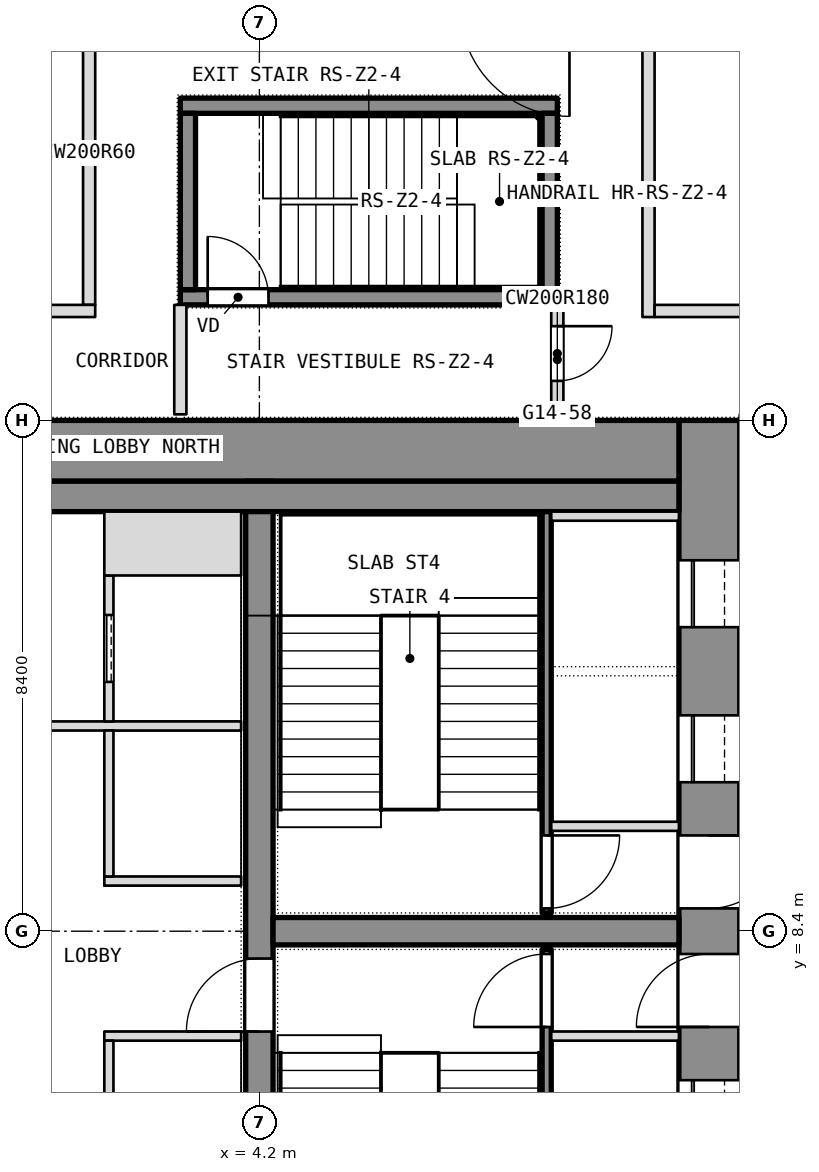
"""IFC4 building model, lengths in metres.
Left out: names, types, materials, properties, quantities, classifications, styles, units other than length and angle.
Written with IfcOpenShell. Run it as: python <this file> out.ifc"""

import sys

from ifc_helpers import new_model, si_unit, direction, frame, frame_2d, origin, place, context, subcontext, project, spatial, rectangle, extrude, element, fill, save


model = new_model("IFC4")
c1 = context("Model", 3, precision=1e-05, world=origin(), true_north=direction((0.0, 1.0)))
c2 = subcontext(c1, "Body", "Model", "MODEL_VIEW")
j1 = project(units=[si_unit("LENGTHUNIT", "METRE"), si_unit("PLANEANGLEUNIT", "RADIAN")], contexts=[c1])
p1 = place(None, origin())
s1 = spatial("IfcSite", under=j1, at=p1, CompositionType="ELEMENT")
p2 = place(p1, origin())
s2 = spatial("IfcBuilding", under=s1, at=p2, CompositionType="ELEMENT")
p3 = place(p2, frame((0.0, 0.0, 158.9)))
s3 = spatial("IfcBuildingStorey", under=s2, at=p3, CompositionType="ELEMENT", Elevation=158.9)
p4 = place(p3, frame((11.6, 0.0, 0.0), z_axis=(0.0, 0.0, 1.0), x_axis=(0.0, 1.0, 0.0)))
e1 = element("IfcWall", 1, at=p4, inside=s3, PredefinedType="SHEAR", context=c2, shape_type="SweptSolid", body=[
    extrude(rectangle(XDim=16.8, YDim=1.0, at=frame_2d((8.4, 0.0))), origin(), (0.0, 0.0, 1.0), 3.6),
])
p5 = place(p4, frame((2.3, 0.0, 0.0)))
e2 = element("IfcOpeningElement", 2, at=p5, cuts=e1, PredefinedType="OPENING", context=c2, shape_type="SweptSolid", body=[
    extrude(rectangle(XDim=1.1, YDim=2.1, at=frame_2d((0.55, 1.05))), frame((0.0, 0.5, 0.0), z_axis=(0.0, -1.0, 0.0), x_axis=(1.0, 0.0, 0.0)), (0.0, 0.0, 1.0), 1.0),
])
p6 = place(p4, frame((4.85, 0.0, 0.0)))
e3 = element("IfcOpeningElement", 3, at=p6, cuts=e1, PredefinedType="OPENING", context=c2, shape_type="SweptSolid", body=[
    extrude(rectangle(XDim=1.1, YDim=2.1, at=frame_2d((0.55, 1.05))), frame((0.0, 0.5, 0.0), z_axis=(0.0, -1.0, 0.0), x_axis=(1.0, 0.0, 0.0)), (0.0, 0.0, 1.0), 1.0),
])
p7 = place(p4, frame((6.825, 0.0, 0.0)))
e4 = element("IfcOpeningElement", 4, at=p7, cuts=e1, PredefinedType="OPENING", context=c2, shape_type="SweptSolid", body=[
    extrude(rectangle(XDim=1.2, YDim=2.1, at=frame_2d((0.6, 1.05))), frame((0.0, 0.5, 0.0), z_axis=(0.0, -1.0, 0.0), x_axis=(1.0, 0.0, 0.0)), (0.0, 0.0, 1.0), 1.0),
])
p8 = place(p4, frame((13.4, 0.0, 0.0)))
e5 = element("IfcOpeningElement", 5, at=p8, cuts=e1, PredefinedType="OPENING", context=c2, shape_type="SweptSolid", body=[
    extrude(rectangle(XDim=1.1, YDim=2.1, at=frame_2d((0.55, 1.05))), frame((0.0, 0.5, 0.0), z_axis=(0.0, -1.0, 0.0), x_axis=(1.0, 0.0, 0.0)), (0.0, 0.0, 1.0), 1.0),
])
p9 = place(p4, frame((10.85, 0.0, 0.0)))
e6 = element("IfcOpeningElement", 6, at=p9, cuts=e1, PredefinedType="OPENING", context=c2, shape_type="SweptSolid", body=[
    extrude(rectangle(XDim=1.1, YDim=2.1, at=frame_2d((0.55, 1.05))), frame((0.0, 0.5, 0.0), z_axis=(0.0, -1.0, 0.0), x_axis=(1.0, 0.0, 0.0)), (0.0, 0.0, 1.0), 1.0),
])
p10 = place(p4, frame((8.775, 0.0, 0.0)))
e7 = element("IfcOpeningElement", 7, at=p10, cuts=e1, PredefinedType="OPENING", context=c2, shape_type="SweptSolid", body=[
    extrude(rectangle(XDim=1.2, YDim=2.1, at=frame_2d((0.6, 1.05))), frame((0.0, 0.5, 0.0), z_axis=(0.0, -1.0, 0.0), x_axis=(1.0, 0.0, 0.0)), (0.0, 0.0, 1.0), 1.0),
])
p11 = place(p3, frame((-11.1, 16.3, 0.0), z_axis=(0.0, 0.0, 1.0), x_axis=(1.0, 0.0, 0.0)))
e8 = element("IfcWall", 8, at=p11, inside=s3, PredefinedType="SHEAR", context=c2, shape_type="SweptSolid", body=[
    extrude(rectangle(XDim=22.2, YDim=1.0, at=frame_2d((11.1, 0.0))), origin(), (0.0, 0.0, 1.0), 3.6),
])
p12 = place(p3, frame((4.2, 1.0, 0.0), z_axis=(0.0, 0.0, 1.0), x_axis=(0.0, 1.0, 0.0)))
e9 = element("IfcWall", 9, at=p12, inside=s3, PredefinedType="SHEAR", context=c2, shape_type="SweptSolid", body=[
    extrude(rectangle(XDim=14.8, YDim=0.45, at=frame_2d((7.4, 0.0))), origin(), (0.0, 0.0, 1.0), 3.6),
])
p13 = place(p12, frame((5.75, 0.0, 0.0)))
e10 = element("IfcOpeningElement", 10, at=p13, cuts=e9, PredefinedType="OPENING", context=c2, shape_type="SweptSolid", body=[
    extrude(rectangle(XDim=1.2, YDim=2.1, at=frame_2d((0.6, 1.05))), frame((0.0, 0.225, 0.0), z_axis=(0.0, -1.0, 0.0), x_axis=(1.0, 0.0, 0.0)), (0.0, 0.0, 1.0), 0.45),
])
p14 = place(p3, frame((4.425, 8.4, 0.0), z_axis=(0.0, 0.0, 1.0), x_axis=(1.0, 0.0, 0.0)))
e11 = element("IfcWall", 11, at=p14, inside=s3, PredefinedType="SHEAR", context=c2, shape_type="SweptSolid", body=[
    extrude(rectangle(XDim=6.675, YDim=0.45, at=frame_2d((3.337, 0.0))), origin(), (0.0, 0.0, 1.0), 3.6),
])
p15 = place(p3, frame((10.6, 18.5, 0.0), z_axis=(0.0, 0.0, 1.0), x_axis=(0.0, 1.0, 0.0)))
e12 = element("IfcWall", 12, at=p15, inside=s3, PredefinedType="PARTITIONING", context=c2, shape_type="SweptSolid", body=[
    extrude(rectangle(XDim=5.0, YDim=0.2, at=frame_2d((2.5, 0.0))), origin(), (0.0, 0.0, 1.0), 3.34),
])
p16 = place(p3, frame((9.1, 16.9, 0.0), z_axis=(0.0, 0.0, 1.0), x_axis=(0.0, 1.0, 0.0)))
e13 = element("IfcWall", 13, at=p16, inside=s3, PredefinedType="PARTITIONING", context=c2, shape_type="SweptSolid", body=[
    extrude(rectangle(XDim=1.8, YDim=0.2, at=frame_2d((0.9, 0.0))), origin(), (0.0, 0.0, 1.0), 3.34),
])
p17 = place(p16, frame((0.55, 0.0, 0.0)))
e14 = element("IfcOpeningElement", 14, at=p17, cuts=e13, PredefinedType="OPENING", context=c2, shape_type="SweptSolid", body=[
    extrude(rectangle(XDim=0.9, YDim=2.1, at=frame_2d((0.45, 1.05))), frame((0.0, 0.1, 0.0), z_axis=(0.0, -1.0, 0.0), x_axis=(1.0, 0.0, 0.0)), (0.0, 0.0, 1.0), 0.2),
])
p18 = place(p3, frame((2.9, 16.9, 0.0), z_axis=(0.0, 0.0, 1.0), x_axis=(0.0, 1.0, 0.0)))
e15 = element("IfcWall", 15, at=p18, inside=s3, PredefinedType="PARTITIONING", context=c2, shape_type="SweptSolid", body=[
    extrude(rectangle(XDim=1.8, YDim=0.2, at=frame_2d((0.9, 0.0))), origin(), (0.0, 0.0, 1.0), 3.34),
])
p19 = place(p3, frame((1.4, 18.7, 0.0), z_axis=(0.0, 0.0, 1.0), x_axis=(0.0, 1.0, 0.0)))
e16 = element("IfcWall", 16, at=p19, inside=s3, PredefinedType="PARTITIONING", context=c2, shape_type="SweptSolid", body=[
    extrude(rectangle(XDim=5.0, YDim=0.2, at=frame_2d((2.5, 0.0))), origin(), (0.0, 0.0, 1.0), 3.34),
])
p20 = place(p3, frame((-16.9, 18.6, 0.0), z_axis=(0.0, 0.0, 1.0), x_axis=(1.0, 0.0, 0.0)))
e17 = element("IfcWall", 17, at=p20, inside=s3, PredefinedType="PARTITIONING", context=c2, shape_type="SweptSolid", body=[
    extrude(rectangle(XDim=18.4, YDim=0.2, at=frame_2d((9.2, 0.0))), origin(), (0.0, 0.0, 1.0), 3.34),
])
p21 = place(p20, frame((0.5, 0.0, 0.0)))
e18 = element("IfcOpeningElement", 18, at=p21, cuts=e17, PredefinedType="OPENING", context=c2, shape_type="SweptSolid", body=[
    extrude(rectangle(XDim=1.0, YDim=2.1, at=frame_2d((0.5, 1.05))), frame((0.0, 0.1, 0.0), z_axis=(0.0, -1.0, 0.0), x_axis=(1.0, 0.0, 0.0)), (0.0, 0.0, 1.0), 0.2),
])
p22 = place(p20, frame((15.0, 0.0, 0.0)))
e19 = element("IfcOpeningElement", 19, at=p22, cuts=e17, PredefinedType="OPENING", context=c2, shape_type="SweptSolid", body=[
    extrude(rectangle(XDim=1.0, YDim=2.1, at=frame_2d((0.5, 1.05))), frame((0.0, 0.1, 0.0), z_axis=(0.0, -1.0, 0.0), x_axis=(1.0, 0.0, 0.0)), (0.0, 0.0, 1.0), 0.2),
])
p23 = place(p20, frame((5.9, 0.0, 0.0)))
e20 = element("IfcOpeningElement", 20, at=p23, cuts=e17, PredefinedType="OPENING", context=c2, shape_type="SweptSolid", body=[
    extrude(rectangle(XDim=1.0, YDim=2.1, at=frame_2d((0.5, 1.05))), frame((0.0, 0.1, 0.0), z_axis=(0.0, -1.0, 0.0), x_axis=(1.0, 0.0, 0.0)), (0.0, 0.0, 1.0), 0.2),
])
p24 = place(p20, frame((10.1, 0.0, 0.0)))
e21 = element("IfcOpeningElement", 21, at=p24, cuts=e17, PredefinedType="OPENING", context=c2, shape_type="SweptSolid", body=[
    extrude(rectangle(XDim=1.0, YDim=2.1, at=frame_2d((0.5, 1.05))), frame((0.0, 0.1, 0.0), z_axis=(0.0, -1.0, 0.0), x_axis=(1.0, 0.0, 0.0)), (0.0, 0.0, 1.0), 0.2),
])
p25 = place(p3, frame((10.7, 18.6, 0.0), z_axis=(0.0, 0.0, 1.0), x_axis=(1.0, 0.0, 0.0)))
e22 = element("IfcWall", 22, at=p25, inside=s3, PredefinedType="PARTITIONING", context=c2, shape_type="SweptSolid", body=[
    extrude(rectangle(XDim=6.2, YDim=0.2, at=frame_2d((3.1, 0.0))), origin(), (0.0, 0.0, 1.0), 3.34),
])
p26 = place(p25, frame((2.3, 0.0, 0.0)))
e23 = element("IfcOpeningElement", 23, at=p26, cuts=e22, PredefinedType="OPENING", context=c2, shape_type="SweptSolid", body=[
    extrude(rectangle(XDim=1.0, YDim=2.1, at=frame_2d((0.5, 1.05))), frame((0.0, 0.1, 0.0), z_axis=(0.0, -1.0, 0.0), x_axis=(1.0, 0.0, 0.0)), (0.0, 0.0, 1.0), 0.2),
])
p27 = place(p3, frame((-11.1, 15.55, 0.0), z_axis=(0.0, 0.0, 1.0), x_axis=(1.0, 0.0, 0.0)))
e24 = element("IfcWall", 24, at=p27, inside=s3, PredefinedType="PARTITIONING", context=c2, shape_type="SweptSolid", body=[
    extrude(rectangle(XDim=22.2, YDim=0.5, at=frame_2d((11.1, 0.0))), origin(), (0.0, 0.0, 1.0), 3.34),
])
p28 = place(p3, frame((8.925, 1.5, 0.0), z_axis=(0.0, 0.0, 1.0), x_axis=(0.0, 1.0, 0.0)))
e25 = element("IfcWall", 25, at=p28, inside=s3, PredefinedType="SHEAR", context=c2, shape_type="SweptSolid", body=[
    extrude(rectangle(XDim=6.6, YDim=0.15, at=frame_2d((3.3, 0.0))), origin(), (0.0, 0.0, 1.0), 3.34),
])
p29 = place(p28, frame((5.325, 0.0, 0.0)))
e26 = element("IfcOpeningElement", 26, at=p29, cuts=e25, PredefinedType="OPENING", context=c2, shape_type="SweptSolid", body=[
    extrude(rectangle(XDim=1.2, YDim=2.1, at=frame_2d((0.6, 1.05))), frame((0.0, 0.075, 0.0), z_axis=(0.0, -1.0, 0.0), x_axis=(1.0, 0.0, 0.0)), (0.0, 0.0, 1.0), 0.15),
])
p30 = place(p3, frame((9.0, 6.675, 0.0), z_axis=(0.0, 0.0, 1.0), x_axis=(1.0, 0.0, 0.0)))
e27 = element("IfcWall", 27, at=p30, inside=s3, PredefinedType="SHEAR", context=c2, shape_type="SweptSolid", body=[
    extrude(rectangle(XDim=2.1, YDim=0.15, at=frame_2d((1.05, 0.0))), origin(), (0.0, 0.0, 1.0), 3.6),
])
p31 = place(p3, frame((8.925, 8.7, 0.0), z_axis=(0.0, 0.0, 1.0), x_axis=(0.0, 1.0, 0.0)))
e28 = element("IfcWall", 28, at=p31, inside=s3, PredefinedType="SHEAR", context=c2, shape_type="SweptSolid", body=[
    extrude(rectangle(XDim=6.6, YDim=0.15, at=frame_2d((3.3, 0.0))), origin(), (0.0, 0.0, 1.0), 3.34),
])
p32 = place(p31, frame((0.075, 0.0, 0.0)))
e29 = element("IfcOpeningElement", 29, at=p32, cuts=e28, PredefinedType="OPENING", context=c2, shape_type="SweptSolid", body=[
    extrude(rectangle(XDim=1.2, YDim=2.1, at=frame_2d((0.6, 1.05))), frame((0.0, 0.075, 0.0), z_axis=(0.0, -1.0, 0.0), x_axis=(1.0, 0.0, 0.0)), (0.0, 0.0, 1.0), 0.15),
])
for number, where, z_axis, x_axis in (
    (30, (9.0, 10.125, 0.0), (0.0, 0.0, 1.0), (1.0, 0.0, 0.0)),
    (31, (9.0, 15.225, 0.0), (0.0, 0.0, 1.0), (1.0, 0.0, 0.0)),
):
    element("IfcWall", number, at=place(p3, frame(where, z_axis=z_axis, x_axis=x_axis)), inside=s3, PredefinedType="SHEAR", context=c2, shape_type="SweptSolid", body=[
        extrude(rectangle(XDim=2.1, YDim=0.15, at=frame_2d((1.05, 0.0))), origin(), (0.0, 0.0, 1.0), 3.6),
    ])
p33 = place(p3, frame((-3.9, 11.775, 0.0), z_axis=(0.0, 0.0, 1.0), x_axis=(1.0, 0.0, 0.0)))
e32 = element("IfcWall", 32, at=p33, inside=s3, PredefinedType="PARTITIONING", context=c2, shape_type="SweptSolid", body=[
    extrude(rectangle(XDim=7.8, YDim=0.15, at=frame_2d((3.9, 0.0))), origin(), (0.0, 0.0, 1.0), 3.34),
])
p34 = place(p33, frame((3.3, 0.0, 0.0)))
e33 = element("IfcOpeningElement", 33, at=p34, cuts=e32, PredefinedType="OPENING", context=c2, shape_type="SweptSolid", body=[
    extrude(rectangle(XDim=1.2, YDim=2.1, at=frame_2d((0.6, 1.05))), frame((0.0, 0.075, 0.0), z_axis=(0.0, -1.0, 0.0), x_axis=(1.0, 0.0, 0.0)), (0.0, 0.0, 1.0), 0.15),
])
p35 = place(p3, frame((1.725, 11.85, 0.0), z_axis=(0.0, 0.0, 1.0), x_axis=(0.0, 1.0, 0.0)))
e34 = element("IfcWall", 34, at=p35, inside=s3, PredefinedType="SHEAR", context=c2, shape_type="SweptSolid", body=[
    extrude(rectangle(XDim=2.4, YDim=0.15, at=frame_2d((1.2, 0.0))), origin(), (0.0, 0.0, 1.0), 3.6),
])
p36 = place(p35, frame((0.65, 0.0, 0.0)))
e35 = element("IfcOpeningElement", 35, at=p36, cuts=e34, PredefinedType="OPENING", context=c2, shape_type="SweptSolid", body=[
    extrude(rectangle(XDim=1.1, YDim=2.1, at=frame_2d((0.55, 1.05))), frame((0.0, 0.075, 0.0), z_axis=(0.0, -1.0, 0.0), x_axis=(1.0, 0.0, 0.0)), (0.0, 0.0, 1.0), 0.15),
])
p37 = place(p3, frame((1.65, 14.775, 0.0), z_axis=(0.0, 0.0, 1.0), x_axis=(1.0, 0.0, 0.0)))
e36 = element("IfcWall", 36, at=p37, inside=s3, PredefinedType="SHEAR", context=c2, shape_type="SweptSolid", body=[
    extrude(rectangle(XDim=2.25, YDim=1.05, at=frame_2d((1.125, 0.0))), origin(), (0.0, 0.0, 1.0), 3.6),
])
for number, where, z_axis, x_axis in (
    (37, (1.65, 6.675, 0.0), (0.0, 0.0, 1.0), (1.0, 0.0, 0.0)),
    (38, (1.65, 9.225, 0.0), (0.0, 0.0, 1.0), (1.0, 0.0, 0.0)),
):
    element("IfcWall", number, at=place(p3, frame(where, z_axis=z_axis, x_axis=x_axis)), inside=s3, PredefinedType="SHEAR", context=c2, shape_type="SweptSolid", body=[
        extrude(rectangle(XDim=2.25, YDim=0.15, at=frame_2d((1.125, 0.0))), origin(), (0.0, 0.0, 1.0), 3.6),
    ])
p38 = place(p3, frame((1.725, 4.2, 0.0), z_axis=(0.0, 0.0, 1.0), x_axis=(0.0, 1.0, 0.0)))
e39 = element("IfcWall", 39, at=p38, inside=s3, PredefinedType="SHEAR", context=c2, shape_type="SweptSolid", body=[
    extrude(rectangle(XDim=2.4, YDim=0.15, at=frame_2d((1.2, 0.0))), origin(), (0.0, 0.0, 1.0), 3.6),
])
p39 = place(p3, frame((1.725, 9.3, 0.0), z_axis=(0.0, 0.0, 1.0), x_axis=(0.0, 1.0, 0.0)))
e40 = element("IfcWall", 40, at=p39, inside=s3, PredefinedType="SHEAR", context=c2, shape_type="SweptSolid", body=[
    extrude(rectangle(XDim=2.4, YDim=0.15, at=frame_2d((1.2, 0.0))), origin(), (0.0, 0.0, 1.0), 3.6),
])
p40 = place(p3, frame((12.1, 16.8, 0.0), z_axis=(0.0, 0.0, 1.0), x_axis=(1.0, 0.0, 0.0)))
e41 = element("IfcWall", 41, at=p40, inside=s3, PredefinedType="PARTITIONING", context=c2, shape_type="SweptSolid", body=[
    extrude(rectangle(XDim=4.6, YDim=0.2, at=frame_2d((2.3, 0.0))), origin(), (0.0, 0.0, 1.0), 2.89),
])
p41 = place(p3, frame((2.9, 18.825, 0.1), z_axis=(0.0, 0.0, 1.0), x_axis=(1.0, 0.0, 0.0)))
e42 = element("IfcWall", 42, at=p41, inside=s3, PredefinedType="SHEAR", context=c2, shape_type="SweptSolid", body=[
    extrude(rectangle(XDim=6.2, YDim=0.25, at=frame_2d((3.1, 0.0))), origin(), (0.0, 0.0, 1.0), 3.6),
])
p42 = place(p41, frame((0.45, 0.0, 0.0)))
e43 = element("IfcOpeningElement", 43, at=p42, cuts=e42, PredefinedType="OPENING", context=c2, shape_type="SweptSolid", body=[
    extrude(rectangle(XDim=1.0, YDim=2.1, at=frame_2d((0.5, 1.05))), frame((0.0, 0.125, 0.0), z_axis=(0.0, -1.0, 0.0), x_axis=(1.0, 0.0, 0.0)), (0.0, 0.0, 1.0), 0.25),
])
p43 = place(p3, frame((2.9, 21.975, 0.1), z_axis=(0.0, 0.0, 1.0), x_axis=(1.0, 0.0, 0.0)))
e44 = element("IfcWall", 44, at=p43, inside=s3, PredefinedType="SHEAR", context=c2, shape_type="SweptSolid", body=[
    extrude(rectangle(XDim=6.2, YDim=0.25, at=frame_2d((3.1, 0.0))), origin(), (0.0, 0.0, 1.0), 3.6),
])
for number, where, z_axis, x_axis in (
    (45, (3.025, 18.95, 0.1), (0.0, 0.0, 1.0), (0.0, 1.0, 0.0)),
    (46, (8.975, 18.95, 0.1), (0.0, 0.0, 1.0), (0.0, 1.0, 0.0)),
):
    element("IfcWall", number, at=place(p3, frame(where, z_axis=z_axis, x_axis=x_axis)), inside=s3, PredefinedType="SHEAR", context=c2, shape_type="SweptSolid", body=[
        extrude(rectangle(XDim=2.9, YDim=0.25, at=frame_2d((1.45, 0.0))), origin(), (0.0, 0.0, 1.0), 3.6),
    ])
p44 = place(p17, origin())
e47 = element("IfcDoor", 47, at=p44, inside=s3, OperationType="SINGLE_SWING_RIGHT", PredefinedType="DOOR", context=c2, shape_type="SweptSolid", body=[
    extrude(rectangle(XDim=0.9, YDim=2.1, at=frame_2d((0.45, 1.05))), frame((0.0, 0.025, 0.0), z_axis=(0.0, -1.0, 0.0), x_axis=(1.0, 0.0, 0.0)), (0.0, 0.0, 1.0), 0.05),
])
fill(e14, e47)
p45 = place(p42, origin())
e48 = element("IfcDoor", 48, at=p45, inside=s3, OperationType="SINGLE_SWING_LEFT", PredefinedType="DOOR", context=c2, shape_type="SweptSolid", body=[
    extrude(rectangle(XDim=1.0, YDim=2.1, at=frame_2d((0.5, 1.05))), frame((0.0, 0.025, 0.0), z_axis=(0.0, -1.0, 0.0), x_axis=(1.0, 0.0, 0.0)), (0.0, 0.0, 1.0), 0.05),
])
fill(e43, e48)
p46 = place(p6, origin())
e49 = element("IfcDoor", 49, at=p46, inside=s3, OperationType="SLIDING_TO_LEFT", PredefinedType="DOOR", context=c2, shape_type="SweptSolid", body=[
    extrude(rectangle(XDim=1.1, YDim=2.1, at=frame_2d((0.55, 1.05))), frame((0.0, 0.025, 0.0), z_axis=(0.0, -1.0, 0.0), x_axis=(1.0, 0.0, 0.0)), (0.0, 0.0, 1.0), 0.05),
])
fill(e3, e49)
p47 = place(p7, origin())
e50 = element("IfcDoor", 50, at=p47, inside=s3, OperationType="SINGLE_SWING_LEFT", PredefinedType="DOOR", context=c2, shape_type="SweptSolid", body=[
    extrude(rectangle(XDim=1.2, YDim=2.1, at=frame_2d((0.6, 1.05))), frame((0.0, 0.025, 0.0), z_axis=(0.0, -1.0, 0.0), x_axis=(1.0, 0.0, 0.0)), (0.0, 0.0, 1.0), 0.05),
])
fill(e4, e50)
p48 = place(p29, origin())
e51 = element("IfcDoor", 51, at=p48, inside=s3, OperationType="SINGLE_SWING_LEFT", PredefinedType="DOOR", context=c2, shape_type="SweptSolid", body=[
    extrude(rectangle(XDim=1.2, YDim=2.1, at=frame_2d((0.6, 1.05))), frame((0.0, 0.025, 0.0), z_axis=(0.0, -1.0, 0.0), x_axis=(1.0, 0.0, 0.0)), (0.0, 0.0, 1.0), 0.05),
])
fill(e26, e51)
p49 = place(p8, origin())
e52 = element("IfcDoor", 52, at=p49, inside=s3, OperationType="SLIDING_TO_LEFT", PredefinedType="DOOR", context=c2, shape_type="SweptSolid", body=[
    extrude(rectangle(XDim=1.1, YDim=2.1, at=frame_2d((0.55, 1.05))), frame((0.0, 0.025, 0.0), z_axis=(0.0, -1.0, 0.0), x_axis=(1.0, 0.0, 0.0)), (0.0, 0.0, 1.0), 0.05),
])
fill(e5, e52)
p50 = place(p9, origin())
e53 = element("IfcDoor", 53, at=p50, inside=s3, OperationType="SLIDING_TO_LEFT", PredefinedType="DOOR", context=c2, shape_type="SweptSolid", body=[
    extrude(rectangle(XDim=1.1, YDim=2.1, at=frame_2d((0.55, 1.05))), frame((0.0, 0.025, 0.0), z_axis=(0.0, -1.0, 0.0), x_axis=(1.0, 0.0, 0.0)), (0.0, 0.0, 1.0), 0.05),
])
fill(e6, e53)
p51 = place(p10, origin())
e54 = element("IfcDoor", 54, at=p51, inside=s3, OperationType="SINGLE_SWING_LEFT", PredefinedType="DOOR", context=c2, shape_type="SweptSolid", body=[
    extrude(rectangle(XDim=1.2, YDim=2.1, at=frame_2d((0.6, 1.05))), frame((0.0, 0.025, 0.0), z_axis=(0.0, -1.0, 0.0), x_axis=(1.0, 0.0, 0.0)), (0.0, 0.0, 1.0), 0.05),
])
fill(e7, e54)
p52 = place(p32, origin())
e55 = element("IfcDoor", 55, at=p52, inside=s3, OperationType="SINGLE_SWING_LEFT", PredefinedType="DOOR", context=c2, shape_type="SweptSolid", body=[
    extrude(rectangle(XDim=1.2, YDim=2.1, at=frame_2d((0.6, 1.05))), frame((0.0, 0.025, 0.0), z_axis=(0.0, -1.0, 0.0), x_axis=(1.0, 0.0, 0.0)), (0.0, 0.0, 1.0), 0.05),
])
fill(e29, e55)
p53 = place(p36, origin())
e56 = element("IfcDoor", 56, at=p53, inside=s3, OperationType="SLIDING_TO_LEFT", PredefinedType="DOOR", context=c2, shape_type="SweptSolid", body=[
    extrude(rectangle(XDim=1.1, YDim=2.1, at=frame_2d((0.55, 1.05))), frame((0.0, 0.025, 0.0), z_axis=(0.0, -1.0, 0.0), x_axis=(1.0, 0.0, 0.0)), (0.0, 0.0, 1.0), 0.05),
])
fill(e35, e56)
p54 = place(p13, origin())
e57 = element("IfcDoor", 57, at=p54, inside=s3, OperationType="SINGLE_SWING_LEFT", PredefinedType="DOOR", context=c2, shape_type="SweptSolid", body=[
    extrude(rectangle(XDim=1.2, YDim=2.1, at=frame_2d((0.6, 1.05))), frame((0.0, 0.025, 0.0), z_axis=(0.0, -1.0, 0.0), x_axis=(1.0, 0.0, 0.0)), (0.0, 0.0, 1.0), 0.05),
])
fill(e10, e57)
save(model, sys.argv[1])
